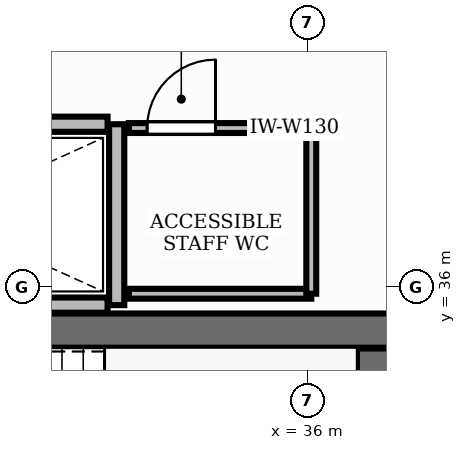
"""IFC4 building model, lengths in metres.
Left out: names, types, materials, properties, quantities, classifications, styles, units other than length and angle.
Written with IfcOpenShell. Run it as: python <this file> out.ifc"""

import sys

from ifc_helpers import new_model, si_unit, direction, frame, frame_2d, origin, place, context, subcontext, project, spatial, rectangle, extrude, element, fill, save


model = new_model("IFC4")
c1 = context("Model", 3, precision=1e-05, world=origin(), true_north=direction((0.0, 1.0)))
c2 = subcontext(c1, "Body", "Model", "MODEL_VIEW")
j1 = project(units=[si_unit("LENGTHUNIT", "METRE"), si_unit("PLANEANGLEUNIT", "RADIAN")], contexts=[c1])
p1 = place(None, origin())
s1 = spatial("IfcSite", under=j1, at=p1, CompositionType="ELEMENT")
p2 = place(p1, origin())
s2 = spatial("IfcBuilding", under=s1, at=p2, CompositionType="ELEMENT")
p3 = place(p2, frame((0.0, 0.0, 51.0)))
s3 = spatial("IfcBuildingStorey", under=s2, at=p3, CompositionType="ELEMENT", Elevation=51.0)
p4 = place(p3, frame((28.852, 35.425, 0.0), z_axis=(0.0, 0.0, 1.0), x_axis=(1.0, 0.0, 0.0)))
e1 = element("IfcWall", 1, at=p4, inside=s3, PredefinedType="SHEAR", context=c2, shape_type="SweptSolid", body=[
    extrude(rectangle(XDim=8.248, YDim=0.45, at=frame_2d((4.124, 0.0))), origin(), (0.0, 0.0, 1.0), 3.9),
])
p5 = place(p3, frame((36.875, 32.11, 0.0), z_axis=(0.0, 0.0, 1.0), x_axis=(0.0, 1.0, 0.0)))
e2 = element("IfcWall", 2, at=p5, inside=s3, PredefinedType="SHEAR", context=c2, shape_type="SweptSolid", body=[
    extrude(rectangle(XDim=3.08, YDim=0.45, at=frame_2d((1.54, 0.0))), origin(), (0.0, 0.0, 1.0), 3.9),
])
p6 = place(p3, frame((33.49, 35.76, 0.0), z_axis=(0.0, 0.0, 1.0), x_axis=(0.0, 1.0, 0.0)))
e3 = element("IfcWall", 3, at=p6, inside=s3, PredefinedType="PARTITIONING", context=c2, shape_type="SweptSolid", body=[
    extrude(rectangle(XDim=2.38, YDim=0.2, at=frame_2d((1.19, 0.0))), origin(), (0.0, 0.0, 1.0), 2.91),
])
for number, where, z_axis, x_axis in (
    (4, (28.8, 35.76, 0.0), (0.0, 0.0, 1.0), (1.0, 0.0, 0.0)),
    (5, (28.8, 38.14, 0.0), (0.0, 0.0, 1.0), (1.0, 0.0, 0.0)),
):
    element("IfcWall", number, at=place(p3, frame(where, z_axis=z_axis, x_axis=x_axis)), inside=s3, PredefinedType="PARTITIONING", context=c2, shape_type="SweptSolid", body=[
        extrude(rectangle(XDim=4.57, YDim=0.2, at=frame_2d((2.285, 0.0))), origin(), (0.0, 0.0, 1.0), 2.91),
    ])
p7 = place(p3, frame((33.65, 38.09, 0.0), z_axis=(0.0, 0.0, 1.0), x_axis=(1.0, 0.0, 0.0)))
e6 = element("IfcWall", 6, at=p7, inside=s3, PredefinedType="PARTITIONING", context=c2, shape_type="SweptSolid", body=[
    extrude(rectangle(XDim=2.4, YDim=0.13, at=frame_2d((1.2, 0.0))), origin(), (0.0, 0.0, 1.0), 2.91),
])
p8 = place(p7, frame((0.24, 0.0, 0.0)))
e7 = element("IfcOpeningElement", 7, at=p8, cuts=e6, PredefinedType="OPENING", context=c2, shape_type="SweptSolid", body=[
    extrude(rectangle(XDim=0.9, YDim=2.15, at=frame_2d((0.45, 1.075))), frame((0.0, 0.08, 0.0), z_axis=(0.0, -1.0, 0.0), x_axis=(1.0, 0.0, 0.0)), (0.0, 0.0, 1.0), 0.16),
])
p9 = place(p3, frame((36.05, 35.91, 0.0), z_axis=(0.0, 0.0, 1.0), x_axis=(-1.0, 0.0, 0.0)))
e8 = element("IfcWall", 8, at=p9, inside=s3, PredefinedType="PARTITIONING", context=c2, shape_type="SweptSolid", body=[
    extrude(rectangle(XDim=2.4, YDim=0.13, at=frame_2d((1.2, 0.0))), origin(), (0.0, 0.0, 1.0), 2.91),
])
p10 = place(p3, frame((36.05, 38.09, 0.0), z_axis=(0.0, 0.0, 1.0), x_axis=(0.0, -1.0, 0.0)))
e9 = element("IfcWall", 9, at=p10, inside=s3, PredefinedType="PARTITIONING", context=c2, shape_type="SweptSolid", body=[
    extrude(rectangle(XDim=2.18, YDim=0.13, at=frame_2d((1.09, 0.0))), origin(), (0.0, 0.0, 1.0), 2.91),
])
p11 = place(p8, origin())
e10 = element("IfcDoor", 10, at=p11, inside=s3, OperationType="SINGLE_SWING_RIGHT", PredefinedType="DOOR", context=c2, shape_type="SweptSolid", body=[
    extrude(rectangle(XDim=0.9, YDim=2.15, at=frame_2d((0.45, 1.075))), frame((0.0, 0.025, 0.0), z_axis=(0.0, -1.0, 0.0), x_axis=(1.0, 0.0, 0.0)), (0.0, 0.0, 1.0), 0.05),
])
fill(e7, e10)
save(model, sys.argv[1])
